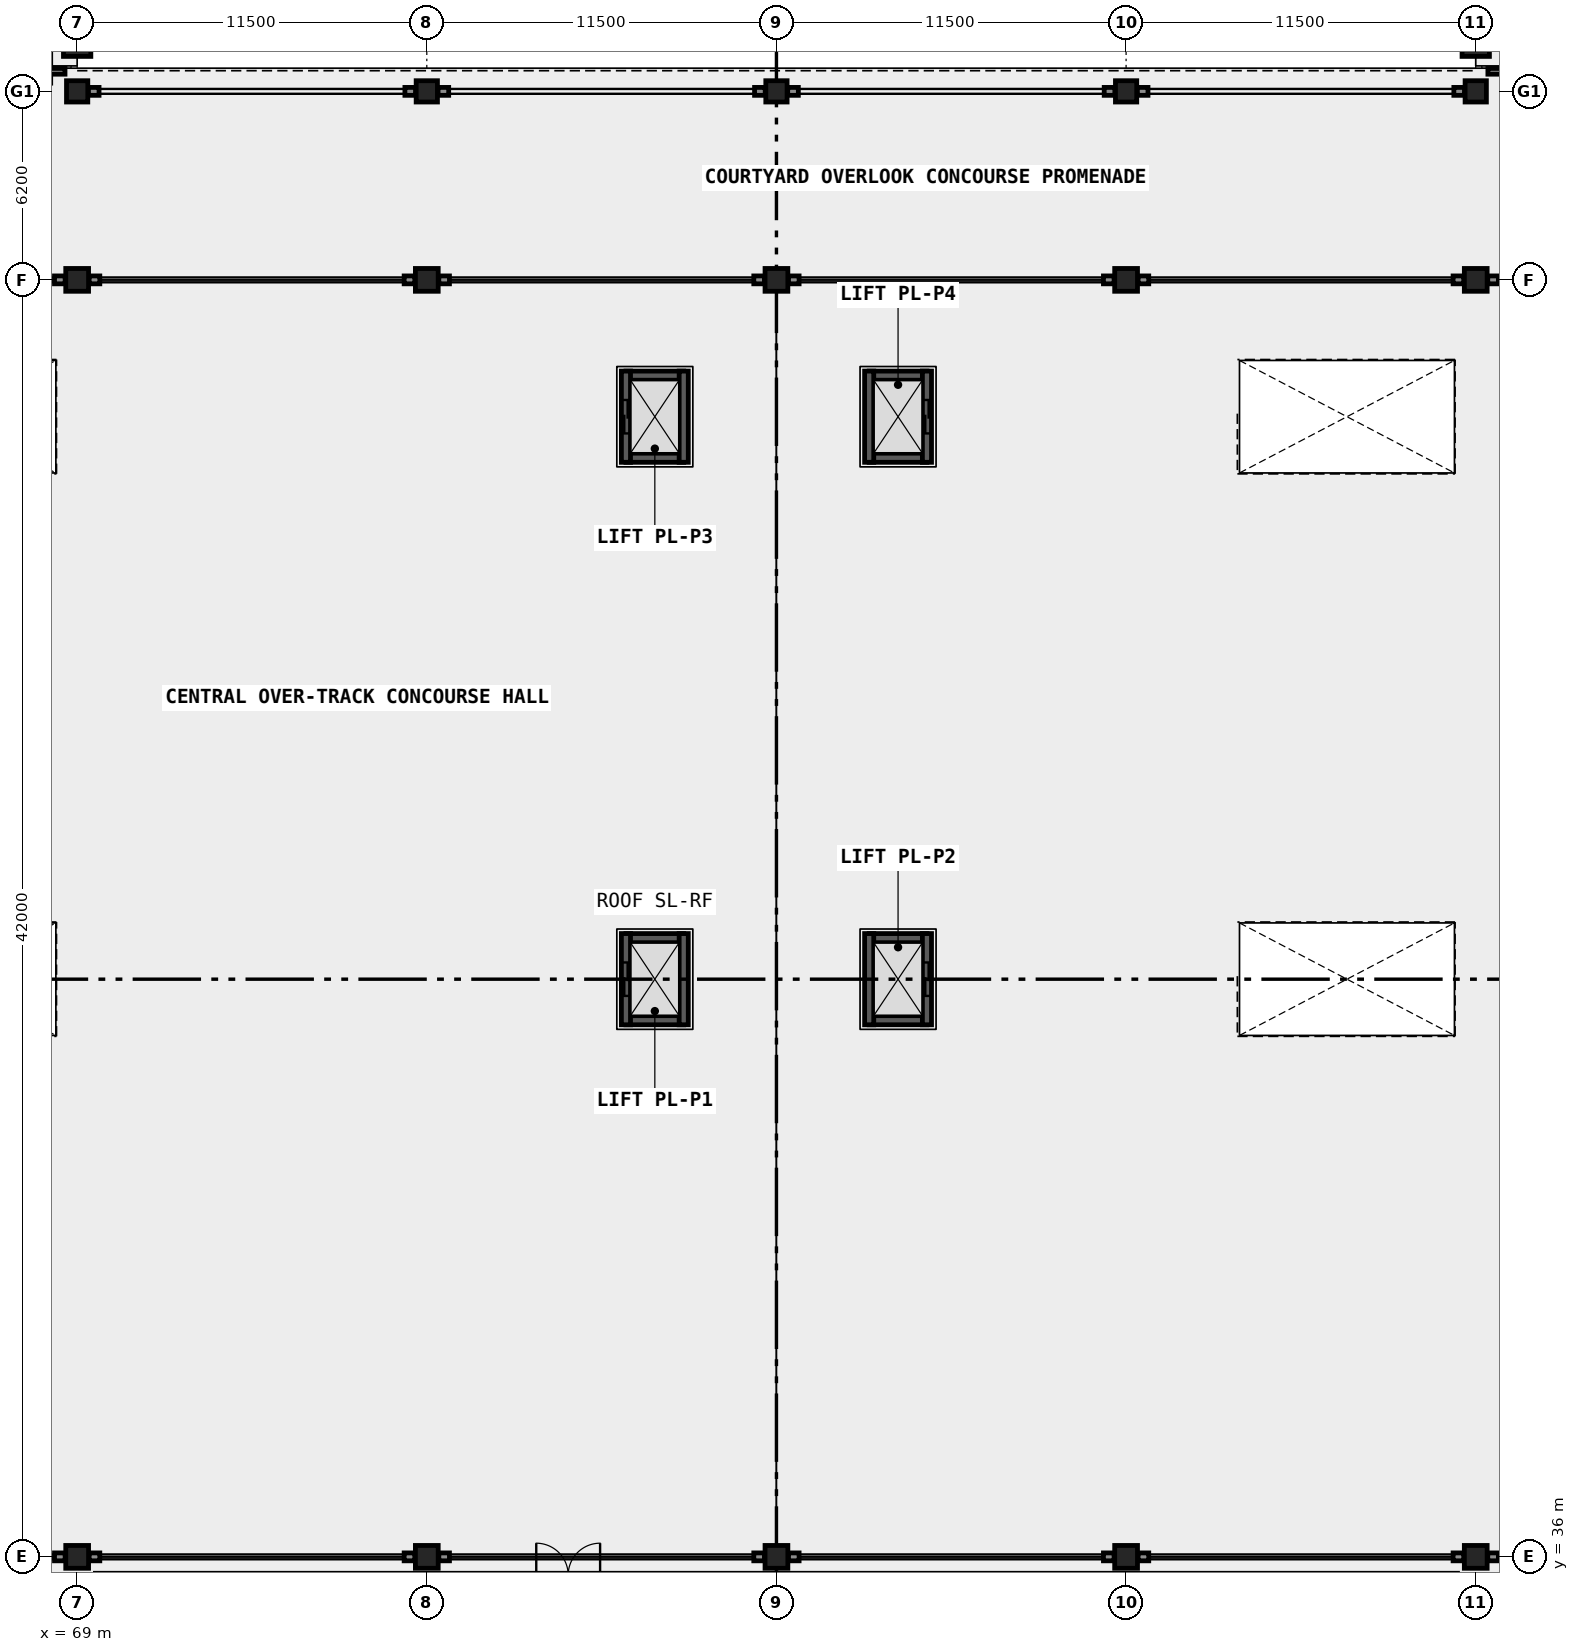
"""IFC4 building model, lengths in metres.
Left out: names, types, materials, properties, quantities, classifications, styles, units other than length and angle.
Written with IfcOpenShell. Run it as: python <this file> out.ifc"""

import sys

from ifc_helpers import new_model, si_unit, direction, frame, frame_2d, origin, origin_2d, place, context, subcontext, project, spatial, rectangle, extrude, element, fill, save


model = new_model("IFC4")
c1 = context("Model", 3, precision=1e-05, world=origin(), true_north=direction((0.0, 1.0)))
c2 = subcontext(c1, "Body", "Model", "MODEL_VIEW")
j1 = project(units=[si_unit("LENGTHUNIT", "METRE"), si_unit("PLANEANGLEUNIT", "RADIAN")], contexts=[c1])
p1 = place(None, origin())
s1 = spatial("IfcSite", under=j1, at=p1, CompositionType="ELEMENT")
p2 = place(p1, origin())
s2 = spatial("IfcBuilding", under=s1, at=p2, CompositionType="ELEMENT")
p3 = place(p2, frame((0.0, 0.0, 8.4)))
s3 = spatial("IfcBuildingStorey", under=s2, at=p3, CompositionType="ELEMENT", Elevation=8.4)
for number, where, z_axis, x_axis in (
    (1, (69.0, 36.0, 0.0), (0.0, 0.0, 1.0), (1.0, 0.0, 0.0)),
    (2, (69.0, 78.0, 0.0), (0.0, 0.0, 1.0), (1.0, 0.0, 0.0)),
):
    element("IfcColumn", number, at=place(p3, frame(where, z_axis=z_axis, x_axis=x_axis)), inside=s3, PredefinedType="COLUMN", context=c2, shape_type="SweptSolid", body=[
        extrude(rectangle(XDim=0.75, YDim=0.75, at=origin_2d()), origin(), (0.0, 0.0, 1.0), 5.4),
    ])
p4 = place(p3, frame((69.0, 84.2, 0.0), z_axis=(0.0, 0.0, 1.0), x_axis=(1.0, 0.0, 0.0)))
e3 = element("IfcColumn", 3, at=p4, inside=s3, PredefinedType="COLUMN", context=c2, shape_type="SweptSolid", body=[
    extrude(rectangle(XDim=0.7, YDim=0.7, at=origin_2d()), origin(), (0.0, 0.0, 1.0), 5.4),
])
p5 = place(p3, frame((69.0, 85.8, 0.0), z_axis=(0.0, 0.0, 1.0), x_axis=(1.0, 0.0, 0.0)))
e4 = element("IfcColumn", 4, at=p5, inside=s3, PredefinedType="COLUMN", context=c2, shape_type="SweptSolid", body=[
    extrude(rectangle(XDim=0.9, YDim=0.9, at=origin_2d()), origin(), (0.0, 0.0, 1.0), 5.4),
])
for number, where, z_axis, x_axis in (
    (5, (80.5, 36.0, 0.0), (0.0, 0.0, 1.0), (1.0, 0.0, 0.0)),
    (6, (80.5, 78.0, 0.0), (0.0, 0.0, 1.0), (1.0, 0.0, 0.0)),
):
    element("IfcColumn", number, at=place(p3, frame(where, z_axis=z_axis, x_axis=x_axis)), inside=s3, PredefinedType="COLUMN", context=c2, shape_type="SweptSolid", body=[
        extrude(rectangle(XDim=0.75, YDim=0.75, at=origin_2d()), origin(), (0.0, 0.0, 1.0), 5.4),
    ])
p6 = place(p3, frame((80.5, 84.2, 0.0), z_axis=(0.0, 0.0, 1.0), x_axis=(1.0, 0.0, 0.0)))
e7 = element("IfcColumn", 7, at=p6, inside=s3, PredefinedType="COLUMN", context=c2, shape_type="SweptSolid", body=[
    extrude(rectangle(XDim=0.7, YDim=0.7, at=origin_2d()), origin(), (0.0, 0.0, 1.0), 5.4),
])
for number, where, z_axis, x_axis in (
    (8, (92.0, 36.0, 0.0), (0.0, 0.0, 1.0), (1.0, 0.0, 0.0)),
    (9, (92.0, 78.0, 0.0), (0.0, 0.0, 1.0), (1.0, 0.0, 0.0)),
):
    element("IfcColumn", number, at=place(p3, frame(where, z_axis=z_axis, x_axis=x_axis)), inside=s3, PredefinedType="COLUMN", context=c2, shape_type="SweptSolid", body=[
        extrude(rectangle(XDim=0.75, YDim=0.75, at=origin_2d()), origin(), (0.0, 0.0, 1.0), 5.4),
    ])
p7 = place(p3, frame((92.0, 84.2, 0.0), z_axis=(0.0, 0.0, 1.0), x_axis=(1.0, 0.0, 0.0)))
e10 = element("IfcColumn", 10, at=p7, inside=s3, PredefinedType="COLUMN", context=c2, shape_type="SweptSolid", body=[
    extrude(rectangle(XDim=0.7, YDim=0.7, at=origin_2d()), origin(), (0.0, 0.0, 1.0), 5.4),
])
for number, where, z_axis, x_axis in (
    (11, (103.5, 36.0, 0.0), (0.0, 0.0, 1.0), (1.0, 0.0, 0.0)),
    (12, (103.5, 78.0, 0.0), (0.0, 0.0, 1.0), (1.0, 0.0, 0.0)),
):
    element("IfcColumn", number, at=place(p3, frame(where, z_axis=z_axis, x_axis=x_axis)), inside=s3, PredefinedType="COLUMN", context=c2, shape_type="SweptSolid", body=[
        extrude(rectangle(XDim=0.75, YDim=0.75, at=origin_2d()), origin(), (0.0, 0.0, 1.0), 5.4),
    ])
p8 = place(p3, frame((103.5, 84.2, 0.0), z_axis=(0.0, 0.0, 1.0), x_axis=(1.0, 0.0, 0.0)))
e13 = element("IfcColumn", 13, at=p8, inside=s3, PredefinedType="COLUMN", context=c2, shape_type="SweptSolid", body=[
    extrude(rectangle(XDim=0.7, YDim=0.7, at=origin_2d()), origin(), (0.0, 0.0, 1.0), 5.4),
])
for number, where, z_axis, x_axis in (
    (14, (115.0, 36.0, 0.0), (0.0, 0.0, 1.0), (1.0, 0.0, 0.0)),
    (15, (115.0, 78.0, 0.0), (0.0, 0.0, 1.0), (1.0, 0.0, 0.0)),
):
    element("IfcColumn", number, at=place(p3, frame(where, z_axis=z_axis, x_axis=x_axis)), inside=s3, PredefinedType="COLUMN", context=c2, shape_type="SweptSolid", body=[
        extrude(rectangle(XDim=0.75, YDim=0.75, at=origin_2d()), origin(), (0.0, 0.0, 1.0), 5.4),
    ])
p9 = place(p3, frame((115.0, 84.2, 0.0), z_axis=(0.0, 0.0, 1.0), x_axis=(1.0, 0.0, 0.0)))
e16 = element("IfcColumn", 16, at=p9, inside=s3, PredefinedType="COLUMN", context=c2, shape_type="SweptSolid", body=[
    extrude(rectangle(XDim=0.7, YDim=0.7, at=origin_2d()), origin(), (0.0, 0.0, 1.0), 5.4),
])
p10 = place(p3, frame((115.0, 85.8, 0.0), z_axis=(0.0, 0.0, 1.0), x_axis=(1.0, 0.0, 0.0)))
e17 = element("IfcColumn", 17, at=p10, inside=s3, PredefinedType="COLUMN", context=c2, shape_type="SweptSolid", body=[
    extrude(rectangle(XDim=0.9, YDim=0.9, at=origin_2d()), origin(), (0.0, 0.0, 1.0), 5.4),
])
for number, where, z_axis, x_axis in (
    (18, (87.05, 53.65, 0.0), (0.0, 0.0, 1.0), (1.0, 0.0, 0.0)),
    (19, (87.05, 56.35, 0.0), (0.0, 0.0, 1.0), (1.0, 0.0, 0.0)),
):
    element("IfcWall", number, at=place(p3, frame(where, z_axis=z_axis, x_axis=x_axis)), inside=s3, PredefinedType="SHEAR", context=c2, shape_type="SweptSolid", body=[
        extrude(rectangle(XDim=1.9, YDim=0.3, at=frame_2d((0.95, 0.0))), origin(), (0.0, 0.0, 1.0), 3.0),
    ])
p11 = place(p3, frame((87.05, 53.5, 0.0), z_axis=(0.0, 0.0, 1.0), x_axis=(0.0, 1.0, 0.0)))
e20 = element("IfcWall", 20, at=p11, inside=s3, PredefinedType="SHEAR", context=c2, shape_type="SweptSolid", body=[
    extrude(rectangle(XDim=3.0, YDim=0.3, at=frame_2d((1.5, 0.0))), origin(), (0.0, 0.0, 1.0), 3.0),
])
p12 = place(p11, frame((0.95, 0.0, 0.0)))
e21 = element("IfcOpeningElement", 21, at=p12, cuts=e20, PredefinedType="OPENING", context=c2, shape_type="SweptSolid", body=[
    extrude(rectangle(XDim=1.1, YDim=2.15, at=frame_2d((0.55, 1.075))), frame((0.0, 0.16, 0.0), z_axis=(0.0, -1.0, 0.0), x_axis=(1.0, 0.0, 0.0)), (0.0, 0.0, 1.0), 0.32),
])
p13 = place(p3, frame((88.95, 53.5, 0.0), z_axis=(0.0, 0.0, 1.0), x_axis=(0.0, 1.0, 0.0)))
e22 = element("IfcWall", 22, at=p13, inside=s3, PredefinedType="SHEAR", context=c2, shape_type="SweptSolid", body=[
    extrude(rectangle(XDim=3.0, YDim=0.3, at=frame_2d((1.5, 0.0))), origin(), (0.0, 0.0, 1.0), 3.0),
])
for number, where, z_axis, x_axis in (
    (23, (95.05, 53.65, 0.0), (0.0, 0.0, 1.0), (1.0, 0.0, 0.0)),
    (24, (95.05, 56.35, 0.0), (0.0, 0.0, 1.0), (1.0, 0.0, 0.0)),
):
    element("IfcWall", number, at=place(p3, frame(where, z_axis=z_axis, x_axis=x_axis)), inside=s3, PredefinedType="SHEAR", context=c2, shape_type="SweptSolid", body=[
        extrude(rectangle(XDim=1.9, YDim=0.3, at=frame_2d((0.95, 0.0))), origin(), (0.0, 0.0, 1.0), 3.0),
    ])
p14 = place(p3, frame((95.05, 53.5, 0.0), z_axis=(0.0, 0.0, 1.0), x_axis=(0.0, 1.0, 0.0)))
e25 = element("IfcWall", 25, at=p14, inside=s3, PredefinedType="SHEAR", context=c2, shape_type="SweptSolid", body=[
    extrude(rectangle(XDim=3.0, YDim=0.3, at=frame_2d((1.5, 0.0))), origin(), (0.0, 0.0, 1.0), 3.0),
])
p15 = place(p3, frame((96.95, 53.5, 0.0), z_axis=(0.0, 0.0, 1.0), x_axis=(0.0, 1.0, 0.0)))
e26 = element("IfcWall", 26, at=p15, inside=s3, PredefinedType="SHEAR", context=c2, shape_type="SweptSolid", body=[
    extrude(rectangle(XDim=3.0, YDim=0.3, at=frame_2d((1.5, 0.0))), origin(), (0.0, 0.0, 1.0), 3.0),
])
p16 = place(p15, frame((0.95, 0.0, 0.0)))
e27 = element("IfcOpeningElement", 27, at=p16, cuts=e26, PredefinedType="OPENING", context=c2, shape_type="SweptSolid", body=[
    extrude(rectangle(XDim=1.1, YDim=2.15, at=frame_2d((0.55, 1.075))), frame((0.0, 0.16, 0.0), z_axis=(0.0, -1.0, 0.0), x_axis=(1.0, 0.0, 0.0)), (0.0, 0.0, 1.0), 0.32),
])
for number, where, z_axis, x_axis in (
    (28, (87.05, 72.15, 0.0), (0.0, 0.0, 1.0), (1.0, 0.0, 0.0)),
    (29, (87.05, 74.85, 0.0), (0.0, 0.0, 1.0), (1.0, 0.0, 0.0)),
):
    element("IfcWall", number, at=place(p3, frame(where, z_axis=z_axis, x_axis=x_axis)), inside=s3, PredefinedType="SHEAR", context=c2, shape_type="SweptSolid", body=[
        extrude(rectangle(XDim=1.9, YDim=0.3, at=frame_2d((0.95, 0.0))), origin(), (0.0, 0.0, 1.0), 3.0),
    ])
p17 = place(p3, frame((87.05, 72.0, 0.0), z_axis=(0.0, 0.0, 1.0), x_axis=(0.0, 1.0, 0.0)))
e30 = element("IfcWall", 30, at=p17, inside=s3, PredefinedType="SHEAR", context=c2, shape_type="SweptSolid", body=[
    extrude(rectangle(XDim=3.0, YDim=0.3, at=frame_2d((1.5, 0.0))), origin(), (0.0, 0.0, 1.0), 3.0),
])
p18 = place(p17, frame((0.95, 0.0, 0.0)))
e31 = element("IfcOpeningElement", 31, at=p18, cuts=e30, PredefinedType="OPENING", context=c2, shape_type="SweptSolid", body=[
    extrude(rectangle(XDim=1.1, YDim=2.15, at=frame_2d((0.55, 1.075))), frame((0.0, 0.16, 0.0), z_axis=(0.0, -1.0, 0.0), x_axis=(1.0, 0.0, 0.0)), (0.0, 0.0, 1.0), 0.32),
])
p19 = place(p3, frame((88.95, 72.0, 0.0), z_axis=(0.0, 0.0, 1.0), x_axis=(0.0, 1.0, 0.0)))
e32 = element("IfcWall", 32, at=p19, inside=s3, PredefinedType="SHEAR", context=c2, shape_type="SweptSolid", body=[
    extrude(rectangle(XDim=3.0, YDim=0.3, at=frame_2d((1.5, 0.0))), origin(), (0.0, 0.0, 1.0), 3.0),
])
for number, where, z_axis, x_axis in (
    (33, (95.05, 72.15, 0.0), (0.0, 0.0, 1.0), (1.0, 0.0, 0.0)),
    (34, (95.05, 74.85, 0.0), (0.0, 0.0, 1.0), (1.0, 0.0, 0.0)),
):
    element("IfcWall", number, at=place(p3, frame(where, z_axis=z_axis, x_axis=x_axis)), inside=s3, PredefinedType="SHEAR", context=c2, shape_type="SweptSolid", body=[
        extrude(rectangle(XDim=1.9, YDim=0.3, at=frame_2d((0.95, 0.0))), origin(), (0.0, 0.0, 1.0), 3.0),
    ])
p20 = place(p3, frame((95.05, 72.0, 0.0), z_axis=(0.0, 0.0, 1.0), x_axis=(0.0, 1.0, 0.0)))
e35 = element("IfcWall", 35, at=p20, inside=s3, PredefinedType="SHEAR", context=c2, shape_type="SweptSolid", body=[
    extrude(rectangle(XDim=3.0, YDim=0.3, at=frame_2d((1.5, 0.0))), origin(), (0.0, 0.0, 1.0), 3.0),
])
p21 = place(p3, frame((96.95, 72.0, 0.0), z_axis=(0.0, 0.0, 1.0), x_axis=(0.0, 1.0, 0.0)))
e36 = element("IfcWall", 36, at=p21, inside=s3, PredefinedType="SHEAR", context=c2, shape_type="SweptSolid", body=[
    extrude(rectangle(XDim=3.0, YDim=0.3, at=frame_2d((1.5, 0.0))), origin(), (0.0, 0.0, 1.0), 3.0),
])
p22 = place(p21, frame((0.95, 0.0, 0.0)))
e37 = element("IfcOpeningElement", 37, at=p22, cuts=e36, PredefinedType="OPENING", context=c2, shape_type="SweptSolid", body=[
    extrude(rectangle(XDim=1.1, YDim=2.15, at=frame_2d((0.55, 1.075))), frame((0.0, 0.16, 0.0), z_axis=(0.0, -1.0, 0.0), x_axis=(1.0, 0.0, 0.0)), (0.0, 0.0, 1.0), 0.32),
])
for number, where, z_axis, x_axis in (
    (38, (68.255, 36.0, 0.0), (0.0, 0.0, 1.0), (1.0, 0.0, 0.0)),
    (39, (68.255, 78.0, 0.0), (0.0, 0.0, 1.0), (1.0, 0.0, 0.0)),
    (40, (69.395, 36.0, 0.0), (0.0, 0.0, 1.0), (1.0, 0.0, 0.0)),
    (41, (79.755, 36.0, 0.0), (0.0, 0.0, 1.0), (1.0, 0.0, 0.0)),
    (42, (69.395, 78.0, 0.0), (0.0, 0.0, 1.0), (1.0, 0.0, 0.0)),
    (43, (79.755, 78.0, 0.0), (0.0, 0.0, 1.0), (1.0, 0.0, 0.0)),
    (44, (80.895, 36.0, 0.0), (0.0, 0.0, 1.0), (1.0, 0.0, 0.0)),
    (45, (91.255, 36.0, 0.0), (0.0, 0.0, 1.0), (1.0, 0.0, 0.0)),
    (46, (80.895, 78.0, 0.0), (0.0, 0.0, 1.0), (1.0, 0.0, 0.0)),
    (47, (91.255, 78.0, 0.0), (0.0, 0.0, 1.0), (1.0, 0.0, 0.0)),
    (48, (92.395, 36.0, 0.0), (0.0, 0.0, 1.0), (1.0, 0.0, 0.0)),
    (49, (102.755, 36.0, 0.0), (0.0, 0.0, 1.0), (1.0, 0.0, 0.0)),
    (50, (92.395, 78.0, 0.0), (0.0, 0.0, 1.0), (1.0, 0.0, 0.0)),
    (51, (102.755, 78.0, 0.0), (0.0, 0.0, 1.0), (1.0, 0.0, 0.0)),
    (52, (103.895, 36.0, 0.0), (0.0, 0.0, 1.0), (1.0, 0.0, 0.0)),
    (53, (114.255, 36.0, 0.0), (0.0, 0.0, 1.0), (1.0, 0.0, 0.0)),
    (54, (103.895, 78.0, 0.0), (0.0, 0.0, 1.0), (1.0, 0.0, 0.0)),
    (55, (114.255, 78.0, 0.0), (0.0, 0.0, 1.0), (1.0, 0.0, 0.0)),
    (56, (115.395, 36.0, 0.0), (0.0, 0.0, 1.0), (1.0, 0.0, 0.0)),
    (57, (115.395, 78.0, 0.0), (0.0, 0.0, 1.0), (1.0, 0.0, 0.0)),
):
    element("IfcWall", number, at=place(p3, frame(where, z_axis=z_axis, x_axis=x_axis)), inside=s3, PredefinedType="SOLIDWALL", context=c2, shape_type="SweptSolid", body=[
        extrude(rectangle(XDim=0.35, YDim=0.26, at=frame_2d((0.175, 0.0))), origin(), (0.0, 0.0, 1.0), 5.1),
    ])
for number, where, z_axis, x_axis in (
    (58, (69.37, 84.2, 0.0), (0.0, 0.0, 1.0), (1.0, 0.0, 0.0)),
    (59, (79.78, 84.2, 0.0), (0.0, 0.0, 1.0), (1.0, 0.0, 0.0)),
    (60, (80.87, 84.2, 0.0), (0.0, 0.0, 1.0), (1.0, 0.0, 0.0)),
    (61, (91.28, 84.2, 0.0), (0.0, 0.0, 1.0), (1.0, 0.0, 0.0)),
    (62, (92.37, 84.2, 0.0), (0.0, 0.0, 1.0), (1.0, 0.0, 0.0)),
    (63, (102.78, 84.2, 0.0), (0.0, 0.0, 1.0), (1.0, 0.0, 0.0)),
    (64, (103.87, 84.2, 0.0), (0.0, 0.0, 1.0), (1.0, 0.0, 0.0)),
    (65, (114.28, 84.2, 0.0), (0.0, 0.0, 1.0), (1.0, 0.0, 0.0)),
):
    element("IfcWall", number, at=place(p3, frame(where, z_axis=z_axis, x_axis=x_axis)), inside=s3, PredefinedType="SOLIDWALL", context=c2, shape_type="SweptSolid", body=[
        extrude(rectangle(XDim=0.35, YDim=0.26, at=frame_2d((0.175, 0.0))), origin(), (0.0, 0.0, 1.0), 5.1),
    ])
for number, where, z_axis, x_axis in (
    (66, (57.9, 84.86, 0.0), (0.0, 0.0, 1.0), (1.0, 0.0, 0.0)),
    (67, (115.4, 84.86, 0.0), (0.0, 0.0, 1.0), (1.0, 0.0, 0.0)),
):
    element("IfcWall", number, at=place(p3, frame(where, z_axis=z_axis, x_axis=x_axis)), inside=s3, PredefinedType="PARAPET", context=c2, shape_type="SweptSolid", body=[
        extrude(rectangle(XDim=10.7, YDim=0.19, at=frame_2d((5.35, 0.0))), origin(), (0.0, 0.0, 1.0), 1.15),
    ])
p23 = place(p12, origin())
e68 = element("IfcDoor", 68, at=p23, inside=s3, OperationType="SLIDING_TO_LEFT", PredefinedType="DOOR", context=c2, shape_type="SweptSolid", body=[
    extrude(rectangle(XDim=1.1, YDim=2.15, at=frame_2d((0.55, 1.075))), frame((0.0, 0.025, 0.0), z_axis=(0.0, -1.0, 0.0), x_axis=(1.0, 0.0, 0.0)), (0.0, 0.0, 1.0), 0.05),
])
fill(e21, e68)
p24 = place(p16, origin())
e69 = element("IfcDoor", 69, at=p24, inside=s3, OperationType="SLIDING_TO_LEFT", PredefinedType="DOOR", context=c2, shape_type="SweptSolid", body=[
    extrude(rectangle(XDim=1.1, YDim=2.15, at=frame_2d((0.55, 1.075))), frame((0.0, 0.025, 0.0), z_axis=(0.0, -1.0, 0.0), x_axis=(1.0, 0.0, 0.0)), (0.0, 0.0, 1.0), 0.05),
])
fill(e27, e69)
p25 = place(p18, origin())
e70 = element("IfcDoor", 70, at=p25, inside=s3, OperationType="SLIDING_TO_LEFT", PredefinedType="DOOR", context=c2, shape_type="SweptSolid", body=[
    extrude(rectangle(XDim=1.1, YDim=2.15, at=frame_2d((0.55, 1.075))), frame((0.0, 0.025, 0.0), z_axis=(0.0, -1.0, 0.0), x_axis=(1.0, 0.0, 0.0)), (0.0, 0.0, 1.0), 0.05),
])
fill(e31, e70)
p26 = place(p22, origin())
e71 = element("IfcDoor", 71, at=p26, inside=s3, OperationType="SLIDING_TO_LEFT", PredefinedType="DOOR", context=c2, shape_type="SweptSolid", body=[
    extrude(rectangle(XDim=1.1, YDim=2.15, at=frame_2d((0.55, 1.075))), frame((0.0, 0.025, 0.0), z_axis=(0.0, -1.0, 0.0), x_axis=(1.0, 0.0, 0.0)), (0.0, 0.0, 1.0), 0.05),
])
fill(e37, e71)
save(model, sys.argv[1])
